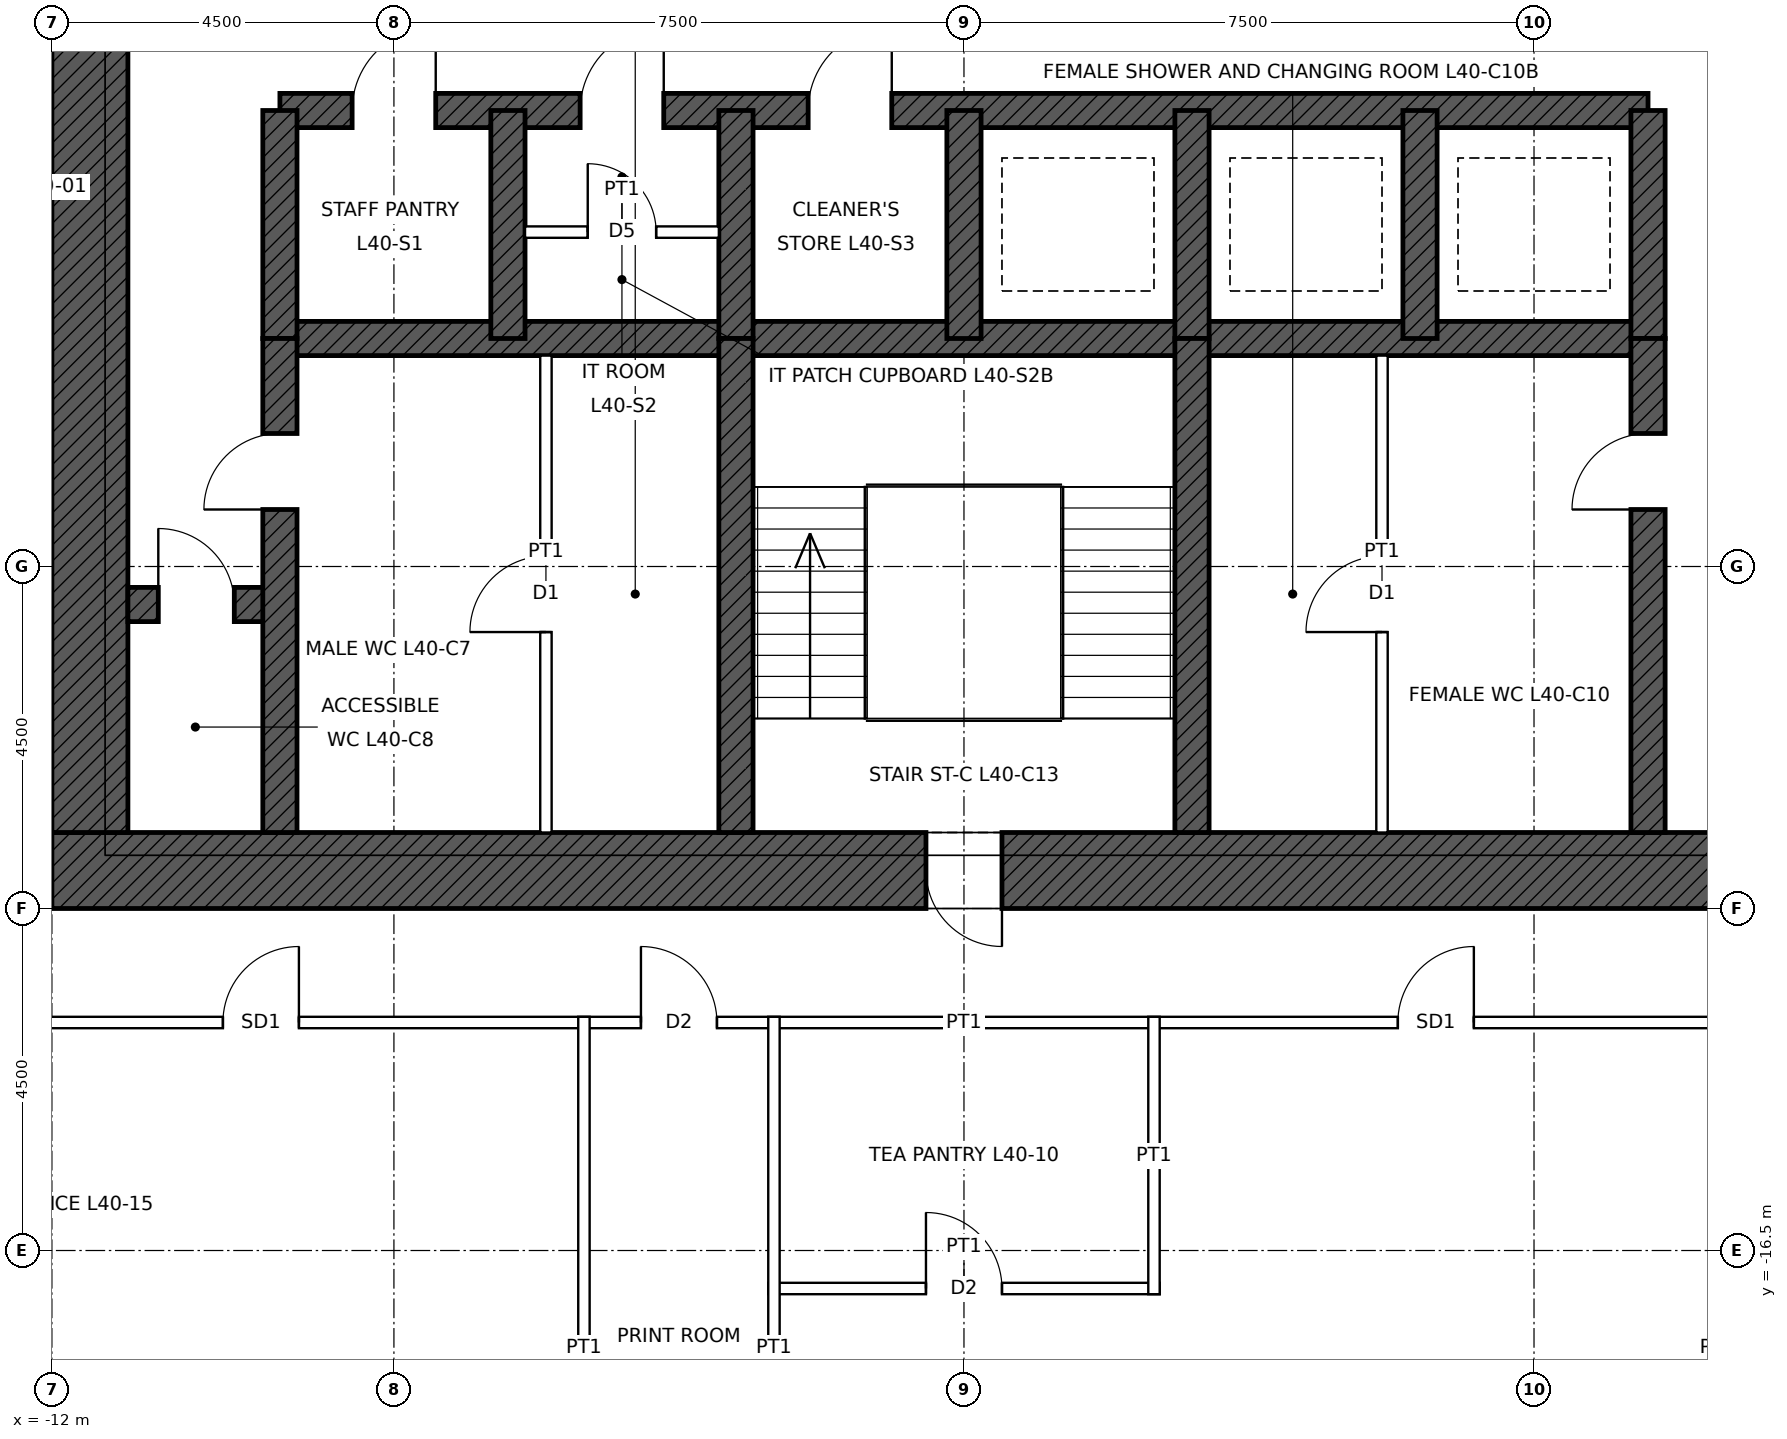
"""IFC4 building model, lengths in metres.
Left out: names, types, materials, properties, quantities, classifications, styles, units other than length and angle.
Written with IfcOpenShell. Run it as: python <this file> out.ifc"""

import sys

from ifc_helpers import new_model, si_unit, direction, frame, frame_2d, origin, place, context, subcontext, project, spatial, rectangle, extrude, element, fill, save


model = new_model("IFC4")
c1 = context("Model", 3, precision=1e-05, world=origin(), true_north=direction((0.0, 1.0)))
c2 = subcontext(c1, "Body", "Model", "MODEL_VIEW")
j1 = project(units=[si_unit("LENGTHUNIT", "METRE"), si_unit("PLANEANGLEUNIT", "RADIAN")], contexts=[c1])
p1 = place(None, origin())
s1 = spatial("IfcSite", under=j1, at=p1, CompositionType="ELEMENT")
p2 = place(p1, origin())
s2 = spatial("IfcBuilding", under=s1, at=p2, CompositionType="ELEMENT")
p3 = place(p2, frame((0.0, 0.0, 193.9)))
s3 = spatial("IfcBuildingStorey", under=s2, at=p3, CompositionType="ELEMENT", Elevation=193.9)
p4 = place(p3, frame((12.0, -11.5, 0.0), z_axis=(0.0, 0.0, 1.0), x_axis=(-1.0, 0.0, 0.0)))
e1 = element("IfcWall", 1, at=p4, inside=s3, PredefinedType="SHEAR", context=c2, shape_type="SweptSolid", body=[
    extrude(rectangle(XDim=24.0, YDim=1.0, at=frame_2d((12.0, 0.0))), origin(), (0.0, 0.0, 1.0), 4.0),
])
p5 = place(p4, frame((11.5, 0.0, 0.0)))
e2 = element("IfcOpeningElement", 2, at=p5, cuts=e1, PredefinedType="OPENING", context=c2, shape_type="SweptSolid", body=[
    extrude(rectangle(XDim=1.0, YDim=2.1, at=frame_2d((0.5, 1.05))), frame((0.0, 0.51, 0.0), z_axis=(0.0, -1.0, 0.0), x_axis=(1.0, 0.0, 0.0)), (0.0, 0.0, 1.0), 1.02),
])
p6 = place(p4, frame((1.0, 0.0, 0.0)))
e3 = element("IfcOpeningElement", 3, at=p6, cuts=e1, PredefinedType="OPENING", context=c2, shape_type="SweptSolid", body=[
    extrude(rectangle(XDim=1.0, YDim=2.4, at=frame_2d((0.5, 1.2))), frame((0.0, 0.51, 0.0), z_axis=(0.0, -1.0, 0.0), x_axis=(1.0, 0.0, 0.0)), (0.0, 0.0, 1.0), 1.02),
])
p7 = place(p3, frame((-11.5, -11.0, 0.0), z_axis=(0.0, 0.0, 1.0), x_axis=(0.0, 1.0, 0.0)))
e4 = element("IfcWall", 4, at=p7, inside=s3, PredefinedType="SHEAR", context=c2, shape_type="SweptSolid", body=[
    extrude(rectangle(XDim=22.0, YDim=1.0, at=frame_2d((11.0, 0.0))), origin(), (0.0, 0.0, 1.0), 4.0),
])
p8 = place(p7, frame((10.5, 0.0, 0.0)))
e5 = element("IfcOpeningElement", 5, at=p8, cuts=e4, PredefinedType="OPENING", context=c2, shape_type="SweptSolid", body=[
    extrude(rectangle(XDim=1.0, YDim=2.4, at=frame_2d((0.5, 1.2))), frame((0.0, 0.51, 0.0), z_axis=(0.0, -1.0, 0.0), x_axis=(1.0, 0.0, 0.0)), (0.0, 0.0, 1.0), 1.02),
])
p9 = place(p3, frame((-9.0, -1.5, 0.0), z_axis=(0.0, 0.0, 1.0), x_axis=(1.0, 0.0, 0.0)))
e6 = element("IfcWall", 6, at=p9, inside=s3, PredefinedType="SHEAR", context=c2, shape_type="SweptSolid", body=[
    extrude(rectangle(XDim=18.0, YDim=0.45, at=frame_2d((9.0, 0.0))), origin(), (0.0, 0.0, 1.0), 4.0),
])
p10 = place(p9, frame((0.95, 0.0, 0.0)))
e7 = element("IfcOpeningElement", 7, at=p10, cuts=e6, PredefinedType="OPENING", context=c2, shape_type="SweptSolid", body=[
    extrude(rectangle(XDim=1.1, YDim=2.1, at=frame_2d((0.55, 1.05))), frame((0.0, 0.235, 0.0), z_axis=(0.0, -1.0, 0.0), x_axis=(1.0, 0.0, 0.0)), (0.0, 0.0, 1.0), 0.47),
])
p11 = place(p9, frame((3.95, 0.0, 0.0)))
e8 = element("IfcOpeningElement", 8, at=p11, cuts=e6, PredefinedType="OPENING", context=c2, shape_type="SweptSolid", body=[
    extrude(rectangle(XDim=1.1, YDim=2.1, at=frame_2d((0.55, 1.05))), frame((0.0, 0.235, 0.0), z_axis=(0.0, -1.0, 0.0), x_axis=(1.0, 0.0, 0.0)), (0.0, 0.0, 1.0), 0.47),
])
p12 = place(p9, frame((6.95, 0.0, 0.0)))
e9 = element("IfcOpeningElement", 9, at=p12, cuts=e6, PredefinedType="OPENING", context=c2, shape_type="SweptSolid", body=[
    extrude(rectangle(XDim=1.1, YDim=2.1, at=frame_2d((0.55, 1.05))), frame((0.0, 0.235, 0.0), z_axis=(0.0, -1.0, 0.0), x_axis=(1.0, 0.0, 0.0)), (0.0, 0.0, 1.0), 0.47),
])
p13 = place(p3, frame((-9.0, -4.5, 0.0), z_axis=(0.0, 0.0, 1.0), x_axis=(1.0, 0.0, 0.0)))
e10 = element("IfcWall", 10, at=p13, inside=s3, PredefinedType="SHEAR", context=c2, shape_type="SweptSolid", body=[
    extrude(rectangle(XDim=18.0, YDim=0.45, at=frame_2d((9.0, 0.0))), origin(), (0.0, 0.0, 1.0), 4.0),
])
p14 = place(p3, frame((-11.0, -8.0, 0.0), z_axis=(0.0, 0.0, 1.0), x_axis=(1.0, 0.0, 0.0)))
e11 = element("IfcWall", 11, at=p14, inside=s3, PredefinedType="SHEAR", context=c2, shape_type="SweptSolid", body=[
    extrude(rectangle(XDim=2.0, YDim=0.45, at=frame_2d((1.0, 0.0))), origin(), (0.0, 0.0, 1.0), 4.0),
])
p15 = place(p14, frame((0.4, 0.0, 0.0)))
e12 = element("IfcOpeningElement", 12, at=p15, cuts=e11, PredefinedType="OPENING", context=c2, shape_type="SweptSolid", body=[
    extrude(rectangle(XDim=1.0, YDim=2.1, at=frame_2d((0.5, 1.05))), frame((0.0, 0.235, 0.0), z_axis=(0.0, -1.0, 0.0), x_axis=(1.0, 0.0, 0.0)), (0.0, 0.0, 1.0), 0.47),
])
for number, where, z_axis, x_axis in (
    (13, (-9.0, -4.5, 0.0), (0.0, 0.0, 1.0), (0.0, 1.0, 0.0)),
    (14, (9.0, -4.5, 0.0), (0.0, 0.0, 1.0), (0.0, 1.0, 0.0)),
    (15, (-6.0, -4.5, 0.0), (0.0, 0.0, 1.0), (0.0, 1.0, 0.0)),
    (16, (-3.0, -4.5, 0.0), (0.0, 0.0, 1.0), (0.0, 1.0, 0.0)),
    (17, (0.0, -4.5, 0.0), (0.0, 0.0, 1.0), (0.0, 1.0, 0.0)),
    (18, (3.0, -4.5, 0.0), (0.0, 0.0, 1.0), (0.0, 1.0, 0.0)),
    (19, (6.0, -4.5, 0.0), (0.0, 0.0, 1.0), (0.0, 1.0, 0.0)),
):
    element("IfcWall", number, at=place(p3, frame(where, z_axis=z_axis, x_axis=x_axis)), inside=s3, PredefinedType="SHEAR", context=c2, shape_type="SweptSolid", body=[
        extrude(rectangle(XDim=3.0, YDim=0.45, at=frame_2d((1.5, 0.0))), origin(), (0.0, 0.0, 1.0), 4.0),
    ])
p16 = place(p3, frame((-9.0, -11.0, 0.0), z_axis=(0.0, 0.0, 1.0), x_axis=(0.0, 1.0, 0.0)))
e20 = element("IfcWall", 20, at=p16, inside=s3, PredefinedType="SHEAR", context=c2, shape_type="SweptSolid", body=[
    extrude(rectangle(XDim=6.5, YDim=0.45, at=frame_2d((3.25, 0.0))), origin(), (0.0, 0.0, 1.0), 4.0),
])
p17 = place(p16, frame((4.25, 0.0, 0.0)))
e21 = element("IfcOpeningElement", 21, at=p17, cuts=e20, PredefinedType="OPENING", context=c2, shape_type="SweptSolid", body=[
    extrude(rectangle(XDim=1.0, YDim=2.1, at=frame_2d((0.5, 1.05))), frame((0.0, 0.235, 0.0), z_axis=(0.0, -1.0, 0.0), x_axis=(1.0, 0.0, 0.0)), (0.0, 0.0, 1.0), 0.47),
])
p18 = place(p3, frame((9.0, -11.0, 0.0), z_axis=(0.0, 0.0, 1.0), x_axis=(0.0, 1.0, 0.0)))
e22 = element("IfcWall", 22, at=p18, inside=s3, PredefinedType="SHEAR", context=c2, shape_type="SweptSolid", body=[
    extrude(rectangle(XDim=6.5, YDim=0.45, at=frame_2d((3.25, 0.0))), origin(), (0.0, 0.0, 1.0), 4.0),
])
p19 = place(p18, frame((4.25, 0.0, 0.0)))
e23 = element("IfcOpeningElement", 23, at=p19, cuts=e22, PredefinedType="OPENING", context=c2, shape_type="SweptSolid", body=[
    extrude(rectangle(XDim=1.0, YDim=2.1, at=frame_2d((0.5, 1.05))), frame((0.0, 0.235, 0.0), z_axis=(0.0, -1.0, 0.0), x_axis=(1.0, 0.0, 0.0)), (0.0, 0.0, 1.0), 0.47),
])
for number, where, z_axis, x_axis in (
    (24, (-3.0, -11.0, 0.0), (0.0, 0.0, 1.0), (0.0, 1.0, 0.0)),
    (25, (3.0, -11.0, 0.0), (0.0, 0.0, 1.0), (0.0, 1.0, 0.0)),
):
    element("IfcWall", number, at=place(p3, frame(where, z_axis=z_axis, x_axis=x_axis)), inside=s3, PredefinedType="SHEAR", context=c2, shape_type="SweptSolid", body=[
        extrude(rectangle(XDim=6.5, YDim=0.45, at=frame_2d((3.25, 0.0))), origin(), (0.0, 0.0, 1.0), 4.0),
    ])
p20 = place(p3, frame((-2.575, -17.0, 0.0), z_axis=(0.0, 0.0, 1.0), x_axis=(1.0, 0.0, 0.0)))
e26 = element("IfcWall", 26, at=p20, inside=s3, PredefinedType="PARTITIONING", context=c2, shape_type="SweptSolid", body=[
    extrude(rectangle(XDim=5.15, YDim=0.15, at=frame_2d((2.575, 0.0))), origin(), (0.0, 0.0, 1.0), 3.85),
])
p21 = place(p20, frame((2.075, 0.0, 0.0)))
e27 = element("IfcOpeningElement", 27, at=p21, cuts=e26, PredefinedType="OPENING", context=c2, shape_type="SweptSolid", body=[
    extrude(rectangle(XDim=1.0, YDim=2.1, at=frame_2d((0.5, 1.05))), frame((0.0, 0.085, 0.0), z_axis=(0.0, -1.0, 0.0), x_axis=(1.0, 0.0, 0.0)), (0.0, 0.0, 1.0), 0.17),
])
p22 = place(p3, frame((-13.575, -13.5, 0.0), z_axis=(0.0, 0.0, 1.0), x_axis=(1.0, 0.0, 0.0)))
e28 = element("IfcWall", 28, at=p22, inside=s3, PredefinedType="PARTITIONING", context=c2, shape_type="SweptSolid", body=[
    extrude(rectangle(XDim=27.15, YDim=0.15, at=frame_2d((13.575, 0.0))), origin(), (0.0, 0.0, 1.0), 3.85),
])
p23 = place(p22, frame((19.283, 0.0, 0.0)))
e29 = element("IfcOpeningElement", 29, at=p23, cuts=e28, PredefinedType="OPENING", context=c2, shape_type="SweptSolid", body=[
    extrude(rectangle(XDim=1.0, YDim=2.4, at=frame_2d((0.5, 1.2))), frame((0.0, 0.085, 0.0), z_axis=(0.0, -1.0, 0.0), x_axis=(1.0, 0.0, 0.0)), (0.0, 0.0, 1.0), 0.17),
])
p24 = place(p22, frame((9.325, 0.0, 0.0)))
e30 = element("IfcOpeningElement", 30, at=p24, cuts=e28, PredefinedType="OPENING", context=c2, shape_type="SweptSolid", body=[
    extrude(rectangle(XDim=1.0, YDim=2.1, at=frame_2d((0.5, 1.05))), frame((0.0, 0.085, 0.0), z_axis=(0.0, -1.0, 0.0), x_axis=(1.0, 0.0, 0.0)), (0.0, 0.0, 1.0), 0.17),
])
p25 = place(p22, frame((3.825, 0.0, 0.0)))
e31 = element("IfcOpeningElement", 31, at=p25, cuts=e28, PredefinedType="OPENING", context=c2, shape_type="SweptSolid", body=[
    extrude(rectangle(XDim=1.0, YDim=2.4, at=frame_2d((0.5, 1.2))), frame((0.0, 0.085, 0.0), z_axis=(0.0, -1.0, 0.0), x_axis=(1.0, 0.0, 0.0)), (0.0, 0.0, 1.0), 0.17),
])
p26 = place(p22, frame((25.318, 0.0, 0.0)))
e32 = element("IfcOpeningElement", 32, at=p26, cuts=e28, PredefinedType="OPENING", context=c2, shape_type="SweptSolid", body=[
    extrude(rectangle(XDim=1.0, YDim=2.4, at=frame_2d((0.5, 1.2))), frame((0.0, 0.085, 0.0), z_axis=(0.0, -1.0, 0.0), x_axis=(1.0, 0.0, 0.0)), (0.0, 0.0, 1.0), 0.17),
])
for number, where, z_axis, x_axis in (
    (33, (-5.0, -22.15, 0.0), (0.0, 0.0, 1.0), (0.0, 1.0, 0.0)),
    (34, (-2.5, -22.15, 0.0), (0.0, 0.0, 1.0), (0.0, 1.0, 0.0)),
):
    element("IfcWall", number, at=place(p3, frame(where, z_axis=z_axis, x_axis=x_axis)), inside=s3, PredefinedType="PARTITIONING", context=c2, shape_type="SweptSolid", body=[
        extrude(rectangle(XDim=8.725, YDim=0.15, at=frame_2d((4.362, 0.0))), origin(), (0.0, 0.0, 1.0), 3.85),
    ])
p27 = place(p3, frame((2.5, -17.075, 0.0), z_axis=(0.0, 0.0, 1.0), x_axis=(0.0, 1.0, 0.0)))
e35 = element("IfcWall", 35, at=p27, inside=s3, PredefinedType="PARTITIONING", context=c2, shape_type="SweptSolid", body=[
    extrude(rectangle(XDim=3.65, YDim=0.15, at=frame_2d((1.825, 0.0))), origin(), (0.0, 0.0, 1.0), 3.85),
])
p28 = place(p3, frame((-5.5, -11.0, 0.0), z_axis=(0.0, 0.0, 1.0), x_axis=(0.0, 1.0, 0.0)))
e36 = element("IfcWall", 36, at=p28, inside=s3, PredefinedType="PARTITIONING", context=c2, shape_type="SweptSolid", body=[
    extrude(rectangle(XDim=6.275, YDim=0.15, at=frame_2d((3.137, 0.0))), origin(), (0.0, 0.0, 1.0), 3.75),
])
p29 = place(p28, frame((2.637, 0.0, 0.0)))
e37 = element("IfcOpeningElement", 37, at=p29, cuts=e36, PredefinedType="OPENING", context=c2, shape_type="SweptSolid", body=[
    extrude(rectangle(XDim=1.0, YDim=2.1, at=frame_2d((0.5, 1.05))), frame((0.0, 0.085, 0.0), z_axis=(0.0, -1.0, 0.0), x_axis=(1.0, 0.0, 0.0)), (0.0, 0.0, 1.0), 0.17),
])
p30 = place(p3, frame((5.5, -11.0, 0.0), z_axis=(0.0, 0.0, 1.0), x_axis=(0.0, 1.0, 0.0)))
e38 = element("IfcWall", 38, at=p30, inside=s3, PredefinedType="PARTITIONING", context=c2, shape_type="SweptSolid", body=[
    extrude(rectangle(XDim=6.275, YDim=0.15, at=frame_2d((3.137, 0.0))), origin(), (0.0, 0.0, 1.0), 3.75),
])
p31 = place(p30, frame((2.637, 0.0, 0.0)))
e39 = element("IfcOpeningElement", 39, at=p31, cuts=e38, PredefinedType="OPENING", context=c2, shape_type="SweptSolid", body=[
    extrude(rectangle(XDim=1.0, YDim=2.1, at=frame_2d((0.5, 1.05))), frame((0.0, 0.085, 0.0), z_axis=(0.0, -1.0, 0.0), x_axis=(1.0, 0.0, 0.0)), (0.0, 0.0, 1.0), 0.17),
])
p32 = place(p3, frame((-5.775, -3.1, 0.0), z_axis=(0.0, 0.0, 1.0), x_axis=(1.0, 0.0, 0.0)))
e40 = element("IfcWall", 40, at=p32, inside=s3, PredefinedType="PARTITIONING", context=c2, shape_type="SweptSolid", body=[
    extrude(rectangle(XDim=2.55, YDim=0.15, at=frame_2d((1.275, 0.0))), origin(), (0.0, 0.0, 1.0), 3.75),
])
p33 = place(p32, frame((0.825, 0.0, 0.0)))
e41 = element("IfcOpeningElement", 41, at=p33, cuts=e40, PredefinedType="OPENING", context=c2, shape_type="SweptSolid", body=[
    extrude(rectangle(XDim=0.9, YDim=2.1, at=frame_2d((0.45, 1.05))), frame((0.0, 0.085, 0.0), z_axis=(0.0, -1.0, 0.0), x_axis=(1.0, 0.0, 0.0)), (0.0, 0.0, 1.0), 0.17),
])
p34 = place(p5, origin())
e42 = element("IfcDoor", 42, at=p34, inside=s3, OperationType="SINGLE_SWING_LEFT", PredefinedType="DOOR", context=c2, shape_type="SweptSolid", body=[
    extrude(rectangle(XDim=1.0, YDim=2.1, at=frame_2d((0.5, 1.05))), frame((0.0, 0.485, 0.0), z_axis=(0.0, -1.0, 0.0), x_axis=(1.0, 0.0, 0.0)), (0.0, 0.0, 1.0), 0.05),
])
fill(e2, e42)
p35 = place(p17, origin())
e43 = element("IfcDoor", 43, at=p35, inside=s3, OperationType="SINGLE_SWING_LEFT", PredefinedType="DOOR", context=c2, shape_type="SweptSolid", body=[
    extrude(rectangle(XDim=1.0, YDim=2.1, at=frame_2d((0.5, 1.05))), frame((0.0, 0.025, 0.0), z_axis=(0.0, -1.0, 0.0), x_axis=(1.0, 0.0, 0.0)), (0.0, 0.0, 1.0), 0.05),
])
fill(e21, e43)
p36 = place(p19, origin())
e44 = element("IfcDoor", 44, at=p36, inside=s3, OperationType="SINGLE_SWING_LEFT", PredefinedType="DOOR", context=c2, shape_type="SweptSolid", body=[
    extrude(rectangle(XDim=1.0, YDim=2.1, at=frame_2d((0.5, 1.05))), frame((0.0, 0.025, 0.0), z_axis=(0.0, -1.0, 0.0), x_axis=(1.0, 0.0, 0.0)), (0.0, 0.0, 1.0), 0.05),
])
fill(e23, e44)
p37 = place(p15, origin())
e45 = element("IfcDoor", 45, at=p37, inside=s3, OperationType="SINGLE_SWING_LEFT", PredefinedType="DOOR", context=c2, shape_type="SweptSolid", body=[
    extrude(rectangle(XDim=1.0, YDim=2.1, at=frame_2d((0.5, 1.05))), frame((0.0, 0.025, 0.0), z_axis=(0.0, -1.0, 0.0), x_axis=(1.0, 0.0, 0.0)), (0.0, 0.0, 1.0), 0.05),
])
fill(e12, e45)
p38 = place(p29, origin())
e46 = element("IfcDoor", 46, at=p38, inside=s3, OperationType="SINGLE_SWING_LEFT", PredefinedType="DOOR", context=c2, shape_type="SweptSolid", body=[
    extrude(rectangle(XDim=1.0, YDim=2.1, at=frame_2d((0.5, 1.05))), frame((0.0, 0.025, 0.0), z_axis=(0.0, -1.0, 0.0), x_axis=(1.0, 0.0, 0.0)), (0.0, 0.0, 1.0), 0.05),
])
fill(e37, e46)
p39 = place(p31, origin())
e47 = element("IfcDoor", 47, at=p39, inside=s3, OperationType="SINGLE_SWING_LEFT", PredefinedType="DOOR", context=c2, shape_type="SweptSolid", body=[
    extrude(rectangle(XDim=1.0, YDim=2.1, at=frame_2d((0.5, 1.05))), frame((0.0, 0.025, 0.0), z_axis=(0.0, -1.0, 0.0), x_axis=(1.0, 0.0, 0.0)), (0.0, 0.0, 1.0), 0.05),
])
fill(e39, e47)
p40 = place(p10, origin())
e48 = element("IfcDoor", 48, at=p40, inside=s3, OperationType="SINGLE_SWING_RIGHT", PredefinedType="DOOR", context=c2, shape_type="SweptSolid", body=[
    extrude(rectangle(XDim=1.1, YDim=2.1, at=frame_2d((0.55, 1.05))), frame((0.0, 0.025, 0.0), z_axis=(0.0, -1.0, 0.0), x_axis=(1.0, 0.0, 0.0)), (0.0, 0.0, 1.0), 0.05),
])
fill(e7, e48)
p41 = place(p11, origin())
e49 = element("IfcDoor", 49, at=p41, inside=s3, OperationType="SINGLE_SWING_RIGHT", PredefinedType="DOOR", context=c2, shape_type="SweptSolid", body=[
    extrude(rectangle(XDim=1.1, YDim=2.1, at=frame_2d((0.55, 1.05))), frame((0.0, 0.025, 0.0), z_axis=(0.0, -1.0, 0.0), x_axis=(1.0, 0.0, 0.0)), (0.0, 0.0, 1.0), 0.05),
])
fill(e8, e49)
p42 = place(p33, origin())
e50 = element("IfcDoor", 50, at=p42, inside=s3, OperationType="SINGLE_SWING_LEFT", PredefinedType="DOOR", context=c2, shape_type="SweptSolid", body=[
    extrude(rectangle(XDim=0.9, YDim=2.1, at=frame_2d((0.45, 1.05))), frame((0.0, 0.025, 0.0), z_axis=(0.0, -1.0, 0.0), x_axis=(1.0, 0.0, 0.0)), (0.0, 0.0, 1.0), 0.05),
])
fill(e41, e50)
p43 = place(p12, origin())
e51 = element("IfcDoor", 51, at=p43, inside=s3, OperationType="SINGLE_SWING_RIGHT", PredefinedType="DOOR", context=c2, shape_type="SweptSolid", body=[
    extrude(rectangle(XDim=1.1, YDim=2.1, at=frame_2d((0.55, 1.05))), frame((0.0, 0.025, 0.0), z_axis=(0.0, -1.0, 0.0), x_axis=(1.0, 0.0, 0.0)), (0.0, 0.0, 1.0), 0.05),
])
fill(e9, e51)
p44 = place(p23, origin())
e52 = element("IfcDoor", 52, at=p44, inside=s3, OperationType="SINGLE_SWING_RIGHT", PredefinedType="DOOR", context=c2, shape_type="SweptSolid", body=[
    extrude(rectangle(XDim=1.0, YDim=2.4, at=frame_2d((0.5, 1.2))), frame((0.0, 0.025, 0.0), z_axis=(0.0, -1.0, 0.0), x_axis=(1.0, 0.0, 0.0)), (0.0, 0.0, 1.0), 0.05),
])
fill(e29, e52)
p45 = place(p21, origin())
e53 = element("IfcDoor", 53, at=p45, inside=s3, OperationType="SINGLE_SWING_LEFT", PredefinedType="DOOR", context=c2, shape_type="SweptSolid", body=[
    extrude(rectangle(XDim=1.0, YDim=2.1, at=frame_2d((0.5, 1.05))), frame((0.0, 0.025, 0.0), z_axis=(0.0, -1.0, 0.0), x_axis=(1.0, 0.0, 0.0)), (0.0, 0.0, 1.0), 0.05),
])
fill(e27, e53)
p46 = place(p24, origin())
e54 = element("IfcDoor", 54, at=p46, inside=s3, OperationType="SINGLE_SWING_LEFT", PredefinedType="DOOR", context=c2, shape_type="SweptSolid", body=[
    extrude(rectangle(XDim=1.0, YDim=2.1, at=frame_2d((0.5, 1.05))), frame((0.0, 0.025, 0.0), z_axis=(0.0, -1.0, 0.0), x_axis=(1.0, 0.0, 0.0)), (0.0, 0.0, 1.0), 0.05),
])
fill(e30, e54)
p47 = place(p25, origin())
e55 = element("IfcDoor", 55, at=p47, inside=s3, OperationType="SINGLE_SWING_RIGHT", PredefinedType="DOOR", context=c2, shape_type="SweptSolid", body=[
    extrude(rectangle(XDim=1.0, YDim=2.4, at=frame_2d((0.5, 1.2))), frame((0.0, 0.025, 0.0), z_axis=(0.0, -1.0, 0.0), x_axis=(1.0, 0.0, 0.0)), (0.0, 0.0, 1.0), 0.05),
])
fill(e31, e55)
save(model, sys.argv[1])
